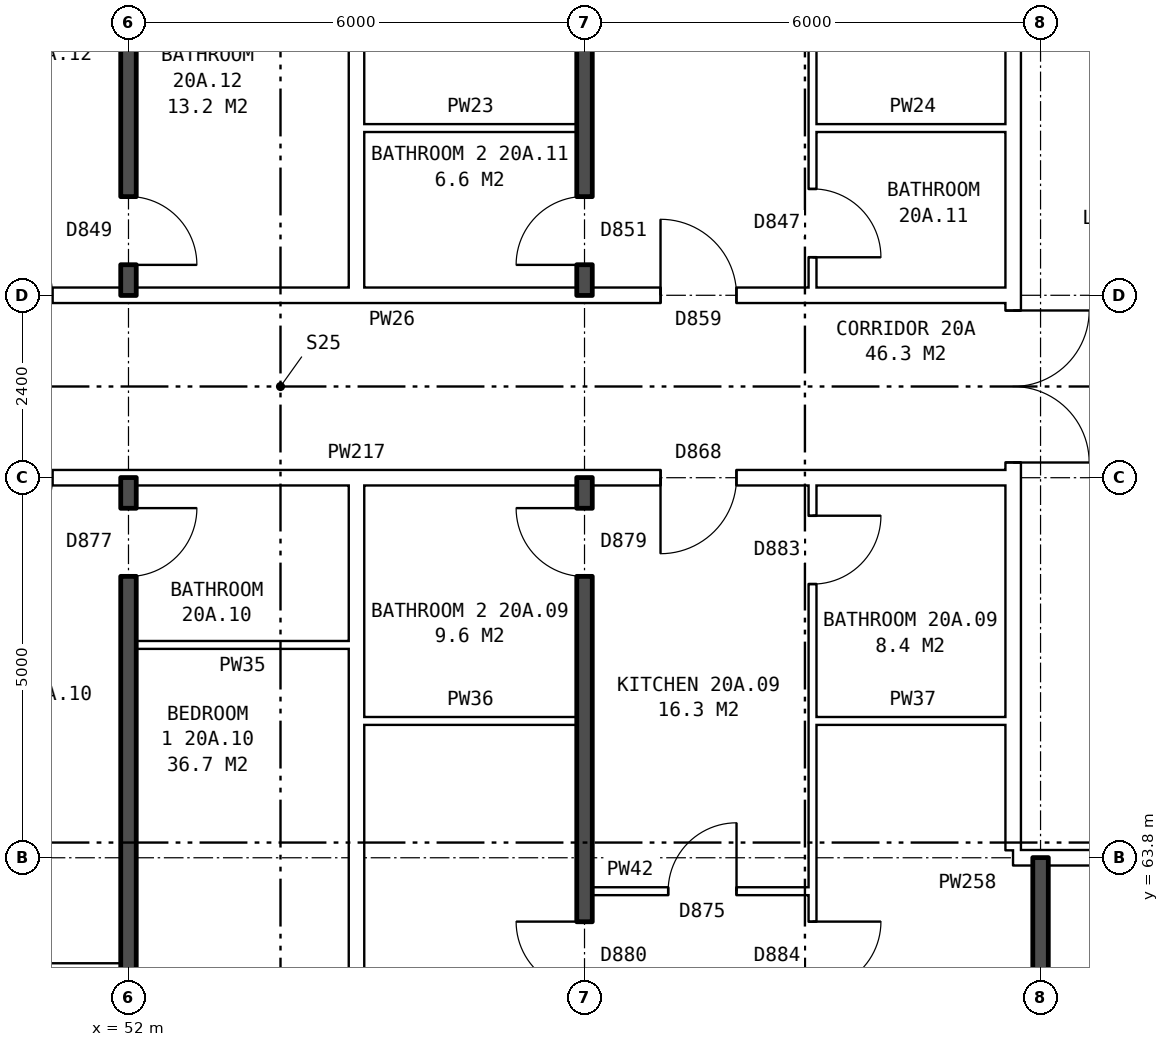
"""IFC4 building model, lengths in metres.
Left out: names, types, materials, properties, quantities, classifications, styles, units other than length and angle.
Written with IfcOpenShell. Run it as: python <this file> out.ifc"""

import sys

from ifc_helpers import new_model, si_unit, direction, frame, frame_2d, origin, place, context, subcontext, project, spatial, rectangle, extrude, element, fill, save


model = new_model("IFC4")
c1 = context("Model", 3, precision=1e-05, world=origin(), true_north=direction((0.0, 1.0)))
c2 = subcontext(c1, "Body", "Model", "MODEL_VIEW")
j1 = project(units=[si_unit("LENGTHUNIT", "METRE"), si_unit("PLANEANGLEUNIT", "RADIAN")], contexts=[c1])
p1 = place(None, origin())
s1 = spatial("IfcSite", under=j1, at=p1, CompositionType="ELEMENT")
p2 = place(p1, origin())
s2 = spatial("IfcBuilding", under=s1, at=p2, CompositionType="ELEMENT")
p3 = place(p2, frame((0.0, 0.0, 74.7)))
s3 = spatial("IfcBuildingStorey", under=s2, at=p3, CompositionType="ELEMENT", Elevation=74.7)
p4 = place(p3, frame((63.64, 63.9, 0.0), z_axis=(0.0, 0.0, 1.0), x_axis=(0.0, 1.0, 0.0)))
e1 = element("IfcWall", 1, at=p4, inside=s3, PredefinedType="PARTITIONING", context=c2, shape_type="SweptSolid", body=[
    extrude(rectangle(XDim=12.2, YDim=0.2, at=frame_2d((6.1, 0.0))), origin(), (0.0, 0.0, 1.0), 2.85),
])
p5 = place(p4, frame((5.1, 0.0, 0.0)))
e2 = element("IfcOpeningElement", 2, at=p5, cuts=e1, PredefinedType="OPENING", context=c2, shape_type="SweptSolid", body=[
    extrude(rectangle(XDim=2.0, YDim=2.1, at=frame_2d((1.0, 1.05))), frame((0.0, 0.11, 0.0), z_axis=(0.0, -1.0, 0.0), x_axis=(1.0, 0.0, 0.0)), (0.0, 0.0, 1.0), 0.22),
])
p6 = place(p3, frame((49.0, 62.36, 0.0), z_axis=(0.0, 0.0, 1.0), x_axis=(1.0, 0.0, 0.0)))
e3 = element("IfcWall", 3, at=p6, inside=s3, PredefinedType="PARTITIONING", context=c2, shape_type="SweptSolid", body=[
    extrude(rectangle(XDim=2.9, YDim=0.1, at=frame_2d((1.45, 0.0))), origin(), (0.0, 0.0, 1.0), 2.85),
])
p7 = place(p6, frame((1.0, 0.0, 0.0)))
e4 = element("IfcOpeningElement", 4, at=p7, cuts=e3, PredefinedType="OPENING", context=c2, shape_type="SweptSolid", body=[
    extrude(rectangle(XDim=0.9, YDim=2.1, at=frame_2d((0.45, 1.05))), frame((0.0, 0.06, 0.0), z_axis=(0.0, -1.0, 0.0), x_axis=(1.0, 0.0, 0.0)), (0.0, 0.0, 1.0), 0.12),
])
p8 = place(p3, frame((58.1, 63.36, 0.0), z_axis=(0.0, 0.0, 1.0), x_axis=(1.0, 0.0, 0.0)))
e5 = element("IfcWall", 5, at=p8, inside=s3, PredefinedType="PARTITIONING", context=c2, shape_type="SweptSolid", body=[
    extrude(rectangle(XDim=2.9, YDim=0.1, at=frame_2d((1.45, 0.0))), origin(), (0.0, 0.0, 1.0), 2.85),
])
p9 = place(p8, frame((1.0, 0.0, 0.0)))
e6 = element("IfcOpeningElement", 6, at=p9, cuts=e5, PredefinedType="OPENING", context=c2, shape_type="SweptSolid", body=[
    extrude(rectangle(XDim=0.9, YDim=2.1, at=frame_2d((0.45, 1.05))), frame((0.0, 0.06, 0.0), z_axis=(0.0, -1.0, 0.0), x_axis=(1.0, 0.0, 0.0)), (0.0, 0.0, 1.0), 0.12),
])
p10 = place(p3, frame((63.64, 63.8, 0.0), z_axis=(0.0, 0.0, 1.0), x_axis=(1.0, 0.0, 0.0)))
e7 = element("IfcWall", 7, at=p10, inside=s3, PredefinedType="PARTITIONING", context=c2, shape_type="SweptSolid", body=[
    extrude(rectangle(XDim=3.0, YDim=0.2, at=frame_2d((1.5, 0.0))), origin(), (0.0, 0.0, 1.0), 2.85),
])
p11 = place(p10, frame((1.18, 0.0, 0.0)))
e8 = element("IfcOpeningElement", 8, at=p11, cuts=e7, PredefinedType="OPENING", context=c2, shape_type="SweptSolid", body=[
    extrude(rectangle(XDim=1.0, YDim=2.1, at=frame_2d((0.5, 1.05))), frame((0.0, 0.11, 0.0), z_axis=(0.0, -1.0, 0.0), x_axis=(1.0, 0.0, 0.0)), (0.0, 0.0, 1.0), 0.22),
])
p12 = place(p3, frame((55.1, 65.6, 0.0), z_axis=(0.0, 0.0, 1.0), x_axis=(1.0, 0.0, 0.0)))
e9 = element("IfcWall", 9, at=p12, inside=s3, PredefinedType="PARTITIONING", context=c2, shape_type="SweptSolid", body=[
    extrude(rectangle(XDim=2.8, YDim=0.1, at=frame_2d((1.4, 0.0))), origin(), (0.0, 0.0, 1.0), 2.85),
])
p13 = place(p3, frame((61.0, 65.6, 0.0), z_axis=(0.0, 0.0, 1.0), x_axis=(1.0, 0.0, 0.0)))
e10 = element("IfcWall", 10, at=p13, inside=s3, PredefinedType="PARTITIONING", context=c2, shape_type="SweptSolid", body=[
    extrude(rectangle(XDim=2.64, YDim=0.1, at=frame_2d((1.32, 0.0))), origin(), (0.0, 0.0, 1.0), 2.85),
])
p14 = place(p3, frame((52.1, 66.6, 0.0), z_axis=(0.0, 0.0, 1.0), x_axis=(1.0, 0.0, 0.0)))
e11 = element("IfcWall", 11, at=p14, inside=s3, PredefinedType="PARTITIONING", context=c2, shape_type="SweptSolid", body=[
    extrude(rectangle(XDim=2.8, YDim=0.1, at=frame_2d((1.4, 0.0))), origin(), (0.0, 0.0, 1.0), 2.85),
])
p15 = place(p3, frame((44.36, 68.8, 0.0), z_axis=(0.0, 0.0, 1.0), x_axis=(1.0, 0.0, 0.0)))
e12 = element("IfcWall", 12, at=p15, inside=s3, PredefinedType="PARTITIONING", context=c2, shape_type="SweptSolid", body=[
    extrude(rectangle(XDim=19.28, YDim=0.2, at=frame_2d((9.64, 0.0))), origin(), (0.0, 0.0, 1.0), 2.85),
])
p16 = place(p15, frame((14.64, 0.0, 0.0)))
e13 = element("IfcOpeningElement", 13, at=p16, cuts=e12, PredefinedType="OPENING", context=c2, shape_type="SweptSolid", body=[
    extrude(rectangle(XDim=1.0, YDim=2.1, at=frame_2d((0.5, 1.05))), frame((0.0, 0.11, 0.0), z_axis=(0.0, -1.0, 0.0), x_axis=(1.0, 0.0, 0.0)), (0.0, 0.0, 1.0), 0.22),
])
p17 = place(p15, frame((5.64, 0.0, 0.0)))
e14 = element("IfcOpeningElement", 14, at=p17, cuts=e12, PredefinedType="OPENING", context=c2, shape_type="SweptSolid", body=[
    extrude(rectangle(XDim=1.0, YDim=2.1, at=frame_2d((0.5, 1.05))), frame((0.0, 0.11, 0.0), z_axis=(0.0, -1.0, 0.0), x_axis=(1.0, 0.0, 0.0)), (0.0, 0.0, 1.0), 0.22),
])
p18 = place(p3, frame((44.36, 71.2, 0.0), z_axis=(0.0, 0.0, 1.0), x_axis=(1.0, 0.0, 0.0)))
e15 = element("IfcWall", 15, at=p18, inside=s3, PredefinedType="PARTITIONING", context=c2, shape_type="SweptSolid", body=[
    extrude(rectangle(XDim=19.28, YDim=0.2, at=frame_2d((9.64, 0.0))), origin(), (0.0, 0.0, 1.0), 2.85),
])
p19 = place(p18, frame((14.64, 0.0, 0.0)))
e16 = element("IfcOpeningElement", 16, at=p19, cuts=e15, PredefinedType="OPENING", context=c2, shape_type="SweptSolid", body=[
    extrude(rectangle(XDim=1.0, YDim=2.1, at=frame_2d((0.5, 1.05))), frame((0.0, 0.11, 0.0), z_axis=(0.0, -1.0, 0.0), x_axis=(1.0, 0.0, 0.0)), (0.0, 0.0, 1.0), 0.22),
])
p20 = place(p18, frame((5.64, 0.0, 0.0)))
e17 = element("IfcOpeningElement", 17, at=p20, cuts=e15, PredefinedType="OPENING", context=c2, shape_type="SweptSolid", body=[
    extrude(rectangle(XDim=1.0, YDim=2.1, at=frame_2d((0.5, 1.05))), frame((0.0, 0.11, 0.0), z_axis=(0.0, -1.0, 0.0), x_axis=(1.0, 0.0, 0.0)), (0.0, 0.0, 1.0), 0.22),
])
p21 = place(p3, frame((55.1, 73.4, 0.0), z_axis=(0.0, 0.0, 1.0), x_axis=(1.0, 0.0, 0.0)))
e18 = element("IfcWall", 18, at=p21, inside=s3, PredefinedType="PARTITIONING", context=c2, shape_type="SweptSolid", body=[
    extrude(rectangle(XDim=2.8, YDim=0.1, at=frame_2d((1.4, 0.0))), origin(), (0.0, 0.0, 1.0), 2.85),
])
p22 = place(p3, frame((61.0, 73.4, 0.0), z_axis=(0.0, 0.0, 1.0), x_axis=(1.0, 0.0, 0.0)))
e19 = element("IfcWall", 19, at=p22, inside=s3, PredefinedType="PARTITIONING", context=c2, shape_type="SweptSolid", body=[
    extrude(rectangle(XDim=2.64, YDim=0.1, at=frame_2d((1.32, 0.0))), origin(), (0.0, 0.0, 1.0), 2.85),
])
p23 = place(p3, frame((52.0, 54.36, 0.0), z_axis=(0.0, 0.0, 1.0), x_axis=(0.0, 1.0, 0.0)))
e20 = element("IfcWall", 20, at=p23, inside=s3, PredefinedType="SOLIDWALL", context=c2, shape_type="SweptSolid", body=[
    extrude(rectangle(XDim=14.44, YDim=0.2, at=frame_2d((7.22, 0.0))), origin(), (0.0, 0.0, 1.0), 2.85),
])
p24 = place(p23, frame((6.7, 0.0, 0.0)))
e21 = element("IfcOpeningElement", 21, at=p24, cuts=e20, PredefinedType="OPENING", context=c2, shape_type="SweptSolid", body=[
    extrude(rectangle(XDim=0.9, YDim=2.1, at=frame_2d((0.45, 1.05))), frame((0.0, 0.11, 0.0), z_axis=(0.0, -1.0, 0.0), x_axis=(1.0, 0.0, 0.0)), (0.0, 0.0, 1.0), 0.22),
])
p25 = place(p23, frame((13.14, 0.0, 0.0)))
e22 = element("IfcOpeningElement", 22, at=p25, cuts=e20, PredefinedType="OPENING", context=c2, shape_type="SweptSolid", body=[
    extrude(rectangle(XDim=0.9, YDim=2.1, at=frame_2d((0.45, 1.05))), frame((0.0, 0.11, 0.0), z_axis=(0.0, -1.0, 0.0), x_axis=(1.0, 0.0, 0.0)), (0.0, 0.0, 1.0), 0.22),
])
p26 = place(p3, frame((52.0, 71.2, 0.0), z_axis=(0.0, 0.0, 1.0), x_axis=(0.0, 1.0, 0.0)))
e23 = element("IfcWall", 23, at=p26, inside=s3, PredefinedType="SOLIDWALL", context=c2, shape_type="SweptSolid", body=[
    extrude(rectangle(XDim=14.44, YDim=0.2, at=frame_2d((7.22, 0.0))), origin(), (0.0, 0.0, 1.0), 2.85),
])
p27 = place(p26, frame((5.84, 0.0, 0.0)))
e24 = element("IfcOpeningElement", 24, at=p27, cuts=e23, PredefinedType="OPENING", context=c2, shape_type="SweptSolid", body=[
    extrude(rectangle(XDim=0.9, YDim=2.1, at=frame_2d((0.45, 1.05))), frame((0.0, 0.11, 0.0), z_axis=(0.0, -1.0, 0.0), x_axis=(1.0, 0.0, 0.0)), (0.0, 0.0, 1.0), 0.22),
])
p28 = place(p26, frame((0.4, 0.0, 0.0)))
e25 = element("IfcOpeningElement", 25, at=p28, cuts=e23, PredefinedType="OPENING", context=c2, shape_type="SweptSolid", body=[
    extrude(rectangle(XDim=0.9, YDim=2.1, at=frame_2d((0.45, 1.05))), frame((0.0, 0.11, 0.0), z_axis=(0.0, -1.0, 0.0), x_axis=(1.0, 0.0, 0.0)), (0.0, 0.0, 1.0), 0.22),
])
for number, where, z_axis, x_axis in (
    (26, (55.0, 54.36, 0.0), (0.0, 0.0, 1.0), (0.0, 1.0, 0.0)),
    (27, (55.0, 71.3, 0.0), (0.0, 0.0, 1.0), (0.0, 1.0, 0.0)),
):
    element("IfcWall", number, at=place(p3, frame(where, z_axis=z_axis, x_axis=x_axis)), inside=s3, PredefinedType="PARTITIONING", context=c2, shape_type="SweptSolid", body=[
        extrude(rectangle(XDim=14.34, YDim=0.2, at=frame_2d((7.17, 0.0))), origin(), (0.0, 0.0, 1.0), 2.85),
    ])
p29 = place(p3, frame((58.0, 54.36, 0.0), z_axis=(0.0, 0.0, 1.0), x_axis=(0.0, 1.0, 0.0)))
e28 = element("IfcWall", 28, at=p29, inside=s3, PredefinedType="SOLIDWALL", context=c2, shape_type="SweptSolid", body=[
    extrude(rectangle(XDim=14.44, YDim=0.2, at=frame_2d((7.22, 0.0))), origin(), (0.0, 0.0, 1.0), 2.85),
])
p30 = place(p29, frame((7.7, 0.0, 0.0)))
e29 = element("IfcOpeningElement", 29, at=p30, cuts=e28, PredefinedType="OPENING", context=c2, shape_type="SweptSolid", body=[
    extrude(rectangle(XDim=0.9, YDim=2.1, at=frame_2d((0.45, 1.05))), frame((0.0, 0.11, 0.0), z_axis=(0.0, -1.0, 0.0), x_axis=(1.0, 0.0, 0.0)), (0.0, 0.0, 1.0), 0.22),
])
p31 = place(p29, frame((13.14, 0.0, 0.0)))
e30 = element("IfcOpeningElement", 30, at=p31, cuts=e28, PredefinedType="OPENING", context=c2, shape_type="SweptSolid", body=[
    extrude(rectangle(XDim=0.9, YDim=2.1, at=frame_2d((0.45, 1.05))), frame((0.0, 0.11, 0.0), z_axis=(0.0, -1.0, 0.0), x_axis=(1.0, 0.0, 0.0)), (0.0, 0.0, 1.0), 0.22),
])
p32 = place(p3, frame((58.0, 71.2, 0.0), z_axis=(0.0, 0.0, 1.0), x_axis=(0.0, 1.0, 0.0)))
e31 = element("IfcWall", 31, at=p32, inside=s3, PredefinedType="SOLIDWALL", context=c2, shape_type="SweptSolid", body=[
    extrude(rectangle(XDim=14.44, YDim=0.2, at=frame_2d((7.22, 0.0))), origin(), (0.0, 0.0, 1.0), 2.85),
])
p33 = place(p32, frame((8.04, 0.0, 0.0)))
e32 = element("IfcOpeningElement", 32, at=p33, cuts=e31, PredefinedType="OPENING", context=c2, shape_type="SweptSolid", body=[
    extrude(rectangle(XDim=0.9, YDim=2.1, at=frame_2d((0.45, 1.05))), frame((0.0, 0.11, 0.0), z_axis=(0.0, -1.0, 0.0), x_axis=(1.0, 0.0, 0.0)), (0.0, 0.0, 1.0), 0.22),
])
p34 = place(p32, frame((0.4, 0.0, 0.0)))
e33 = element("IfcOpeningElement", 33, at=p34, cuts=e31, PredefinedType="OPENING", context=c2, shape_type="SweptSolid", body=[
    extrude(rectangle(XDim=0.9, YDim=2.1, at=frame_2d((0.45, 1.05))), frame((0.0, 0.11, 0.0), z_axis=(0.0, -1.0, 0.0), x_axis=(1.0, 0.0, 0.0)), (0.0, 0.0, 1.0), 0.22),
])
p35 = place(p3, frame((61.0, 54.36, 0.0), z_axis=(0.0, 0.0, 1.0), x_axis=(0.0, 1.0, 0.0)))
e34 = element("IfcWall", 34, at=p35, inside=s3, PredefinedType="PARTITIONING", context=c2, shape_type="SweptSolid", body=[
    extrude(rectangle(XDim=14.34, YDim=0.1, at=frame_2d((7.17, 0.0))), origin(), (0.0, 0.0, 1.0), 2.85),
])
p36 = place(p35, frame((7.7, 0.0, 0.0)))
e35 = element("IfcOpeningElement", 35, at=p36, cuts=e34, PredefinedType="OPENING", context=c2, shape_type="SweptSolid", body=[
    extrude(rectangle(XDim=0.9, YDim=2.1, at=frame_2d((0.45, 1.05))), frame((0.0, 0.06, 0.0), z_axis=(0.0, -1.0, 0.0), x_axis=(1.0, 0.0, 0.0)), (0.0, 0.0, 1.0), 0.12),
])
p37 = place(p35, frame((13.04, 0.0, 0.0)))
e36 = element("IfcOpeningElement", 36, at=p37, cuts=e34, PredefinedType="OPENING", context=c2, shape_type="SweptSolid", body=[
    extrude(rectangle(XDim=0.9, YDim=2.1, at=frame_2d((0.45, 1.05))), frame((0.0, 0.06, 0.0), z_axis=(0.0, -1.0, 0.0), x_axis=(1.0, 0.0, 0.0)), (0.0, 0.0, 1.0), 0.12),
])
p38 = place(p3, frame((61.0, 71.3, 0.0), z_axis=(0.0, 0.0, 1.0), x_axis=(0.0, 1.0, 0.0)))
e37 = element("IfcWall", 37, at=p38, inside=s3, PredefinedType="PARTITIONING", context=c2, shape_type="SweptSolid", body=[
    extrude(rectangle(XDim=14.34, YDim=0.1, at=frame_2d((7.17, 0.0))), origin(), (0.0, 0.0, 1.0), 2.85),
])
p39 = place(p38, frame((7.94, 0.0, 0.0)))
e38 = element("IfcOpeningElement", 38, at=p39, cuts=e37, PredefinedType="OPENING", context=c2, shape_type="SweptSolid", body=[
    extrude(rectangle(XDim=0.9, YDim=2.1, at=frame_2d((0.45, 1.05))), frame((0.0, 0.06, 0.0), z_axis=(0.0, -1.0, 0.0), x_axis=(1.0, 0.0, 0.0)), (0.0, 0.0, 1.0), 0.12),
])
p40 = place(p38, frame((0.4, 0.0, 0.0)))
e39 = element("IfcOpeningElement", 39, at=p40, cuts=e37, PredefinedType="OPENING", context=c2, shape_type="SweptSolid", body=[
    extrude(rectangle(XDim=0.9, YDim=2.1, at=frame_2d((0.45, 1.05))), frame((0.0, 0.06, 0.0), z_axis=(0.0, -1.0, 0.0), x_axis=(1.0, 0.0, 0.0)), (0.0, 0.0, 1.0), 0.12),
])
p41 = place(p3, frame((64.0, 54.36, 0.0), z_axis=(0.0, 0.0, 1.0), x_axis=(0.0, 1.0, 0.0)))
e40 = element("IfcWall", 40, at=p41, inside=s3, PredefinedType="SOLIDWALL", context=c2, shape_type="SweptSolid", body=[
    extrude(rectangle(XDim=9.44, YDim=0.2, at=frame_2d((4.72, 0.0))), origin(), (0.0, 0.0, 1.0), 2.85),
])
p42 = place(p5, frame((2.0, 0.0, 0.0), z_axis=(0.0, 0.0, 1.0), x_axis=(-1.0, 0.0, 0.0)))
e41 = element("IfcDoor", 41, at=p42, inside=s3, OperationType="DOUBLE_DOOR_SINGLE_SWING", PredefinedType="DOOR", context=c2, shape_type="SweptSolid", body=[
    extrude(rectangle(XDim=2.0, YDim=2.1, at=frame_2d((1.0, 1.05))), frame((0.0, 0.025, 0.0), z_axis=(0.0, -1.0, 0.0), x_axis=(1.0, 0.0, 0.0)), (0.0, 0.0, 1.0), 0.05),
])
fill(e2, e41)
p43 = place(p36, frame((0.9, 0.0, 0.0), z_axis=(0.0, 0.0, 1.0), x_axis=(-1.0, 0.0, 0.0)))
e42 = element("IfcDoor", 42, at=p43, inside=s3, OperationType="SINGLE_SWING_LEFT", PredefinedType="DOOR", context=c2, shape_type="SweptSolid", body=[
    extrude(rectangle(XDim=0.9, YDim=2.1, at=frame_2d((0.45, 1.05))), frame((0.0, 0.025, 0.0), z_axis=(0.0, -1.0, 0.0), x_axis=(1.0, 0.0, 0.0)), (0.0, 0.0, 1.0), 0.05),
])
fill(e35, e42)
p44 = place(p30, origin())
e43 = element("IfcDoor", 43, at=p44, inside=s3, OperationType="SINGLE_SWING_RIGHT", PredefinedType="DOOR", context=c2, shape_type="SweptSolid", body=[
    extrude(rectangle(XDim=0.9, YDim=2.1, at=frame_2d((0.45, 1.05))), frame((0.0, 0.025, 0.0), z_axis=(0.0, -1.0, 0.0), x_axis=(1.0, 0.0, 0.0)), (0.0, 0.0, 1.0), 0.05),
])
fill(e29, e43)
p45 = place(p16, frame((1.0, 0.0, 0.0), z_axis=(0.0, 0.0, 1.0), x_axis=(-1.0, 0.0, 0.0)))
e44 = element("IfcDoor", 44, at=p45, inside=s3, OperationType="SINGLE_SWING_RIGHT", PredefinedType="DOOR", context=c2, shape_type="SweptSolid", body=[
    extrude(rectangle(XDim=1.0, YDim=2.1, at=frame_2d((0.5, 1.05))), frame((0.0, 0.025, 0.0), z_axis=(0.0, -1.0, 0.0), x_axis=(1.0, 0.0, 0.0)), (0.0, 0.0, 1.0), 0.05),
])
fill(e13, e44)
p46 = place(p9, origin())
e45 = element("IfcDoor", 45, at=p46, inside=s3, OperationType="SINGLE_SWING_RIGHT", PredefinedType="DOOR", context=c2, shape_type="SweptSolid", body=[
    extrude(rectangle(XDim=0.9, YDim=2.1, at=frame_2d((0.45, 1.05))), frame((0.0, 0.025, 0.0), z_axis=(0.0, -1.0, 0.0), x_axis=(1.0, 0.0, 0.0)), (0.0, 0.0, 1.0), 0.05),
])
fill(e6, e45)
p47 = place(p37, frame((0.9, 0.0, 0.0), z_axis=(0.0, 0.0, 1.0), x_axis=(-1.0, 0.0, 0.0)))
e46 = element("IfcDoor", 46, at=p47, inside=s3, OperationType="SINGLE_SWING_LEFT", PredefinedType="DOOR", context=c2, shape_type="SweptSolid", body=[
    extrude(rectangle(XDim=0.9, YDim=2.1, at=frame_2d((0.45, 1.05))), frame((0.0, 0.025, 0.0), z_axis=(0.0, -1.0, 0.0), x_axis=(1.0, 0.0, 0.0)), (0.0, 0.0, 1.0), 0.05),
])
fill(e36, e46)
p48 = place(p31, origin())
e47 = element("IfcDoor", 47, at=p48, inside=s3, OperationType="SINGLE_SWING_RIGHT", PredefinedType="DOOR", context=c2, shape_type="SweptSolid", body=[
    extrude(rectangle(XDim=0.9, YDim=2.1, at=frame_2d((0.45, 1.05))), frame((0.0, 0.025, 0.0), z_axis=(0.0, -1.0, 0.0), x_axis=(1.0, 0.0, 0.0)), (0.0, 0.0, 1.0), 0.05),
])
fill(e30, e47)
p49 = place(p25, frame((0.9, 0.0, 0.0), z_axis=(0.0, 0.0, 1.0), x_axis=(-1.0, 0.0, 0.0)))
e48 = element("IfcDoor", 48, at=p49, inside=s3, OperationType="SINGLE_SWING_LEFT", PredefinedType="DOOR", context=c2, shape_type="SweptSolid", body=[
    extrude(rectangle(XDim=0.9, YDim=2.1, at=frame_2d((0.45, 1.05))), frame((0.0, 0.025, 0.0), z_axis=(0.0, -1.0, 0.0), x_axis=(1.0, 0.0, 0.0)), (0.0, 0.0, 1.0), 0.05),
])
fill(e22, e48)
p50 = place(p19, origin())
e49 = element("IfcDoor", 49, at=p50, inside=s3, OperationType="SINGLE_SWING_LEFT", PredefinedType="DOOR", context=c2, shape_type="SweptSolid", body=[
    extrude(rectangle(XDim=1.0, YDim=2.1, at=frame_2d((0.5, 1.05))), frame((0.0, 0.025, 0.0), z_axis=(0.0, -1.0, 0.0), x_axis=(1.0, 0.0, 0.0)), (0.0, 0.0, 1.0), 0.05),
])
fill(e16, e49)
p51 = place(p40, frame((0.9, 0.0, 0.0), z_axis=(0.0, 0.0, 1.0), x_axis=(-1.0, 0.0, 0.0)))
e50 = element("IfcDoor", 50, at=p51, inside=s3, OperationType="SINGLE_SWING_RIGHT", PredefinedType="DOOR", context=c2, shape_type="SweptSolid", body=[
    extrude(rectangle(XDim=0.9, YDim=2.1, at=frame_2d((0.45, 1.05))), frame((0.0, 0.025, 0.0), z_axis=(0.0, -1.0, 0.0), x_axis=(1.0, 0.0, 0.0)), (0.0, 0.0, 1.0), 0.05),
])
fill(e39, e50)
p52 = place(p34, origin())
e51 = element("IfcDoor", 51, at=p52, inside=s3, OperationType="SINGLE_SWING_LEFT", PredefinedType="DOOR", context=c2, shape_type="SweptSolid", body=[
    extrude(rectangle(XDim=0.9, YDim=2.1, at=frame_2d((0.45, 1.05))), frame((0.0, 0.025, 0.0), z_axis=(0.0, -1.0, 0.0), x_axis=(1.0, 0.0, 0.0)), (0.0, 0.0, 1.0), 0.05),
])
fill(e33, e51)
p53 = place(p28, frame((0.9, 0.0, 0.0), z_axis=(0.0, 0.0, 1.0), x_axis=(-1.0, 0.0, 0.0)))
e52 = element("IfcDoor", 52, at=p53, inside=s3, OperationType="SINGLE_SWING_RIGHT", PredefinedType="DOOR", context=c2, shape_type="SweptSolid", body=[
    extrude(rectangle(XDim=0.9, YDim=2.1, at=frame_2d((0.45, 1.05))), frame((0.0, 0.025, 0.0), z_axis=(0.0, -1.0, 0.0), x_axis=(1.0, 0.0, 0.0)), (0.0, 0.0, 1.0), 0.05),
])
fill(e25, e52)
save(model, sys.argv[1])
